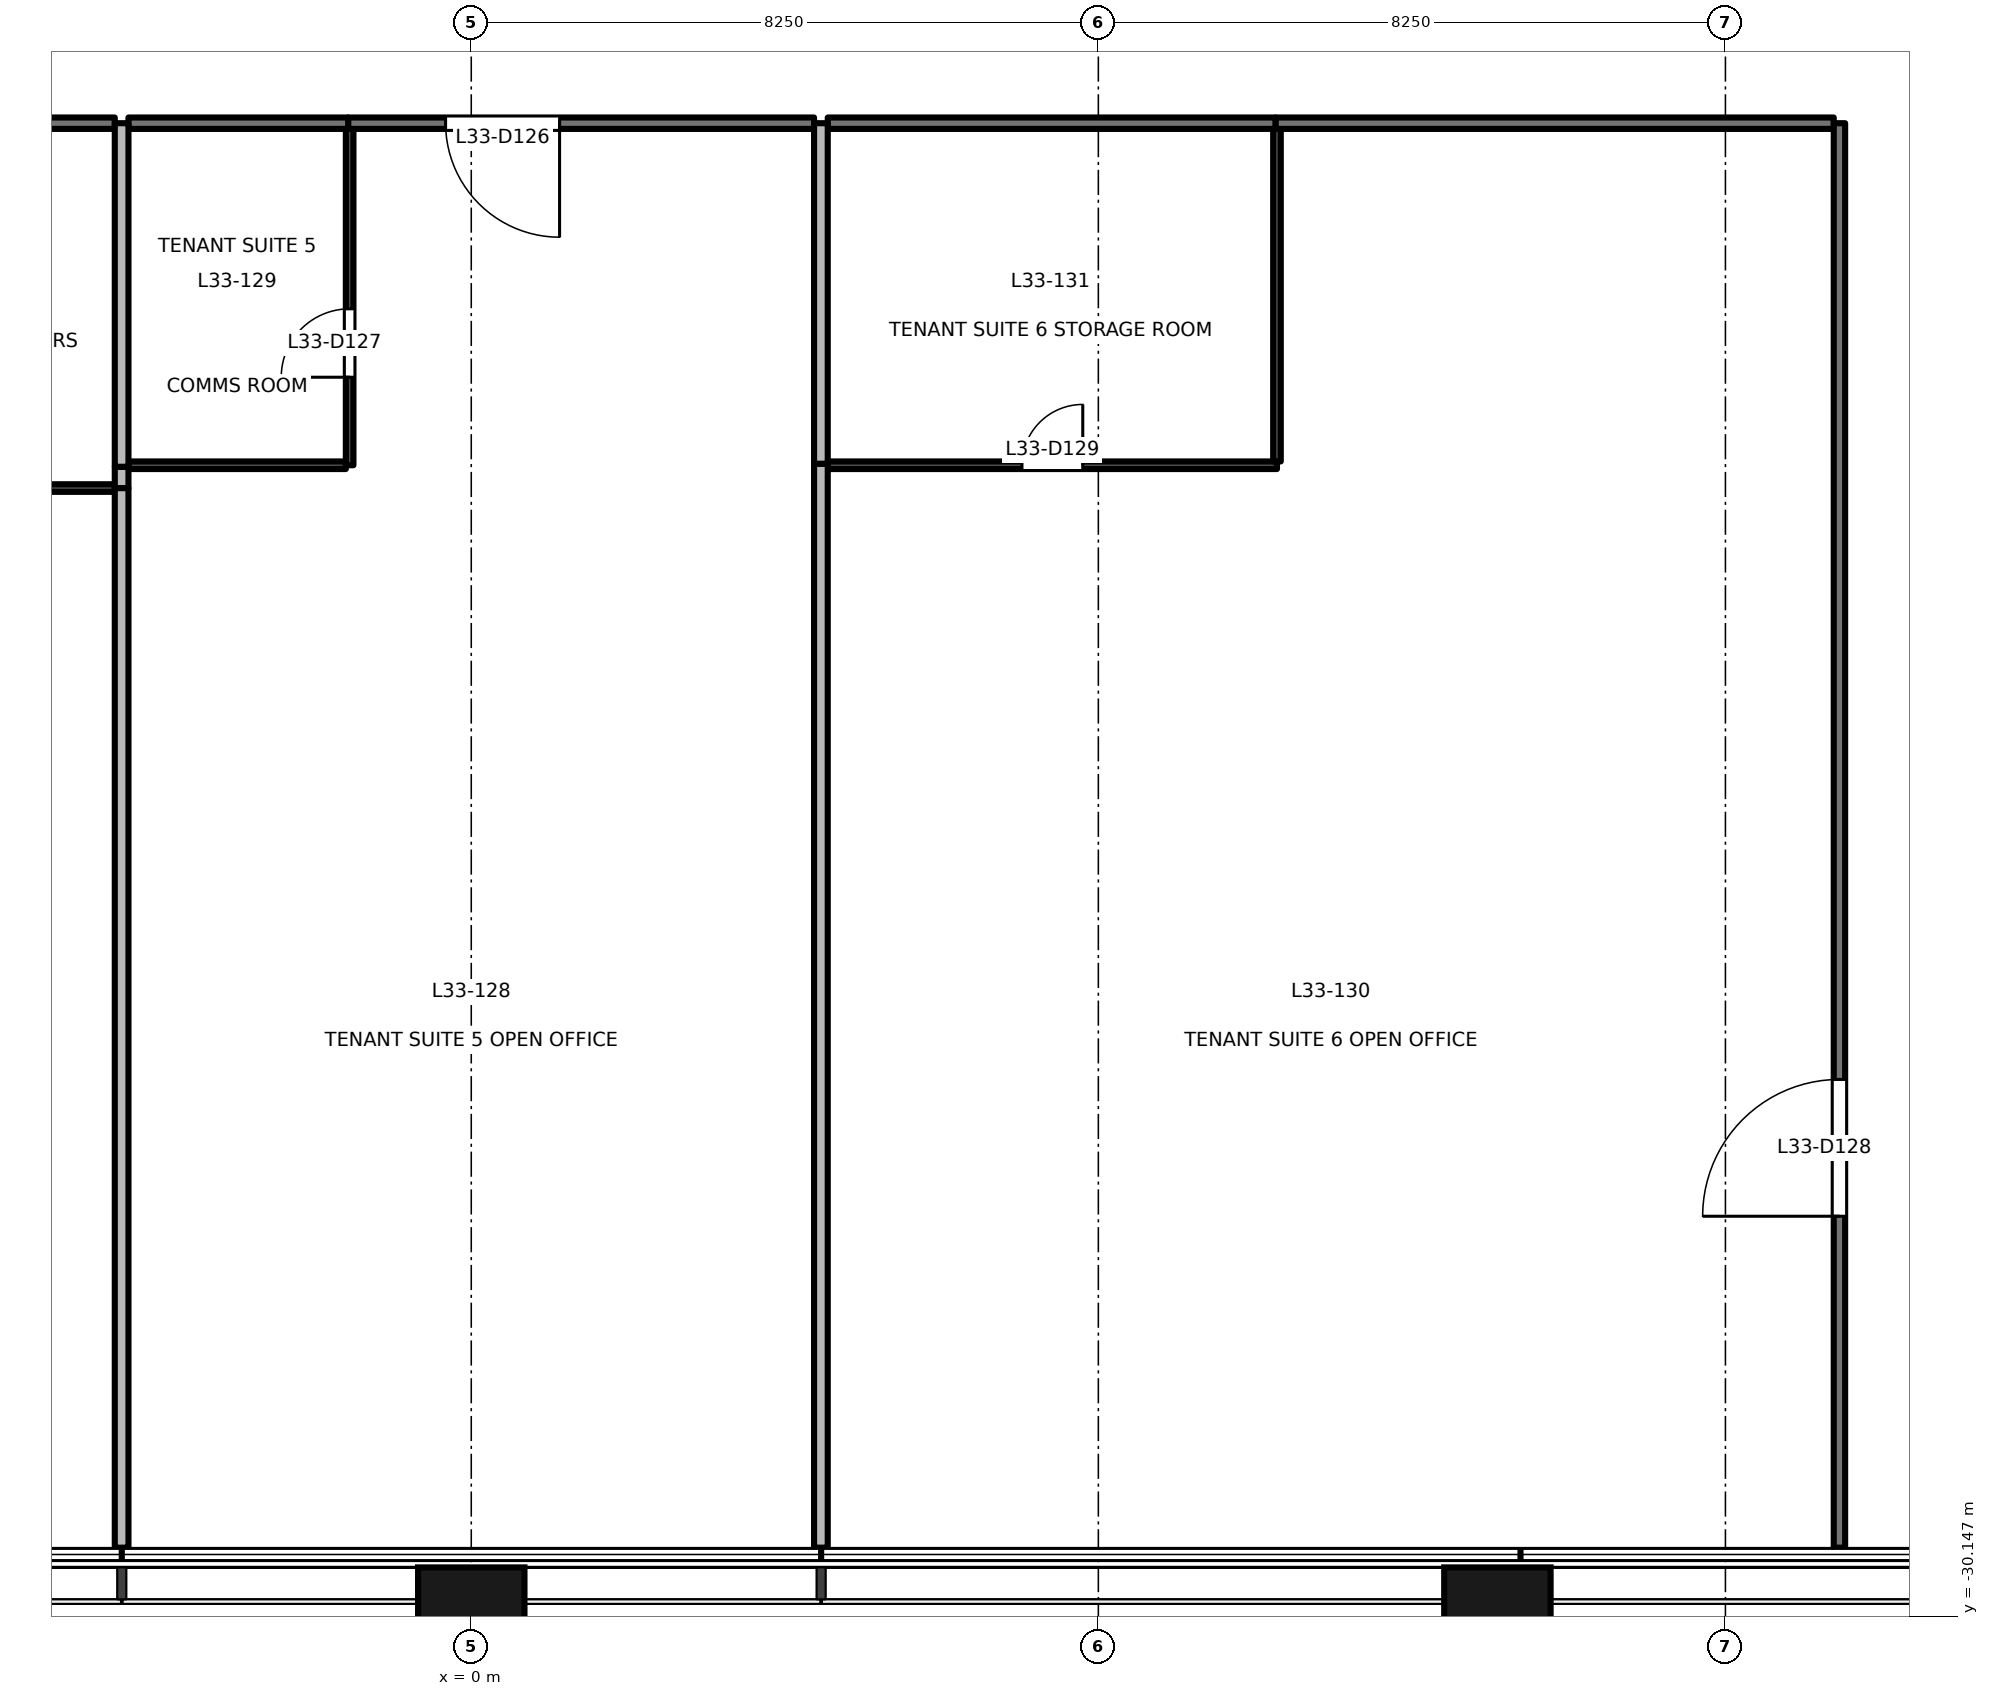
"""IFC4 building model, lengths in metres.
Left out: names, types, materials, properties, quantities, classifications, styles, units other than length and angle.
Written with IfcOpenShell. Run it as: python <this file> out.ifc"""

import sys

from ifc_helpers import new_model, si_unit, direction, frame, frame_2d, origin, origin_2d, place, context, subcontext, project, spatial, rectangle, extrude, element, fill, save


model = new_model("IFC4")
c1 = context("Model", 3, precision=1e-05, world=origin(), true_north=direction((0.0, 1.0)))
c2 = subcontext(c1, "Body", "Model", "MODEL_VIEW")
j1 = project(units=[si_unit("LENGTHUNIT", "METRE"), si_unit("PLANEANGLEUNIT", "RADIAN")], contexts=[c1])
p1 = place(None, origin())
s1 = spatial("IfcSite", under=j1, at=p1, CompositionType="ELEMENT")
p2 = place(p1, origin())
s2 = spatial("IfcBuilding", under=s1, at=p2, CompositionType="ELEMENT")
p3 = place(p2, frame((0.0, 0.0, 146.1)))
s3 = spatial("IfcBuildingStorey", under=s2, at=p3, CompositionType="ELEMENT", Elevation=146.1)
for number, where, z_axis, x_axis in (
    (1, (0.0, -30.4, -0.2), (0.0, 0.0, 1.0), (1.0, 0.0, 0.0)),
    (2, (13.5, -30.4, -0.2), (0.0, 0.0, 1.0), (1.0, 0.0, 0.0)),
):
    element("IfcColumn", number, at=place(p3, frame(where, z_axis=z_axis, x_axis=x_axis)), inside=s3, PredefinedType="COLUMN", context=c2, shape_type="SweptSolid", body=[
        extrude(rectangle(XDim=1.4, YDim=1.8, at=origin_2d()), origin(), (0.0, 0.0, 1.0), 4.0),
    ])
p4 = place(p3, frame((-4.69, -10.5, 0.0), z_axis=(0.0, 0.0, 1.0), x_axis=(-1.0, 0.0, 0.0)))
e3 = element("IfcWall", 3, at=p4, inside=s3, PredefinedType="PARTITIONING", context=c2, shape_type="SweptSolid", body=[
    extrude(rectangle(XDim=5.23, YDim=0.15, at=frame_2d((2.615, 0.0))), origin(), (0.0, 0.0, 1.0), 2.9),
])
p5 = place(p3, frame((4.51, -10.5, 0.0), z_axis=(0.0, 0.0, 1.0), x_axis=(-1.0, 0.0, 0.0)))
e4 = element("IfcWall", 4, at=p5, inside=s3, PredefinedType="PARTITIONING", context=c2, shape_type="SweptSolid", body=[
    extrude(rectangle(XDim=6.13, YDim=0.15, at=frame_2d((3.065, 0.0))), origin(), (0.0, 0.0, 1.0), 2.9),
])
p6 = place(p5, frame((3.348, 0.0, 0.0)))
e5 = element("IfcOpeningElement", 5, at=p6, cuts=e4, PredefinedType="OPENING", context=c2, shape_type="SweptSolid", body=[
    extrude(rectangle(XDim=1.5, YDim=2.1, at=frame_2d((0.75, 1.05))), frame((0.0, 0.085, 0.0), z_axis=(0.0, -1.0, 0.0), x_axis=(1.0, 0.0, 0.0)), (0.0, 0.0, 1.0), 0.171),
])
p7 = place(p3, frame((-1.62, -10.5, 0.0), z_axis=(0.0, 0.0, 1.0), x_axis=(-1.0, 0.0, 0.0)))
e6 = element("IfcWall", 6, at=p7, inside=s3, PredefinedType="PARTITIONING", context=c2, shape_type="SweptSolid", body=[
    extrude(rectangle(XDim=2.89, YDim=0.15, at=frame_2d((1.445, 0.0))), origin(), (0.0, 0.0, 1.0), 2.9),
])
p8 = place(p3, frame((17.925, -10.5, 0.0), z_axis=(0.0, 0.0, 1.0), x_axis=(-1.0, 0.0, 0.0)))
e7 = element("IfcWall", 7, at=p8, inside=s3, PredefinedType="PARTITIONING", context=c2, shape_type="SweptSolid", body=[
    extrude(rectangle(XDim=7.345, YDim=0.15, at=frame_2d((3.672, 0.0))), origin(), (0.0, 0.0, 1.0), 2.9),
])
p9 = place(p3, frame((18.0, -29.24, 0.0), z_axis=(0.0, 0.0, 1.0), x_axis=(0.0, 1.0, 0.0)))
e8 = element("IfcWall", 8, at=p9, inside=s3, PredefinedType="PARTITIONING", context=c2, shape_type="SweptSolid", body=[
    extrude(rectangle(XDim=18.74, YDim=0.15, at=frame_2d((9.37, 0.0))), origin(), (0.0, 0.0, 1.0), 3.8),
])
p10 = place(p9, frame((4.36, 0.0, 0.0)))
e9 = element("IfcOpeningElement", 9, at=p10, cuts=e8, PredefinedType="OPENING", context=c2, shape_type="SweptSolid", body=[
    extrude(rectangle(XDim=1.8, YDim=2.1, at=frame_2d((0.9, 1.05))), frame((0.0, 0.085, 0.0), z_axis=(0.0, -1.0, 0.0), x_axis=(1.0, 0.0, 0.0)), (0.0, 0.0, 1.0), 0.171),
])
p11 = place(p3, frame((10.58, -10.5, 0.0), z_axis=(0.0, 0.0, 1.0), x_axis=(-1.0, 0.0, 0.0)))
e10 = element("IfcWall", 10, at=p11, inside=s3, PredefinedType="PARTITIONING", context=c2, shape_type="SweptSolid", body=[
    extrude(rectangle(XDim=5.89, YDim=0.15, at=frame_2d((2.945, 0.0))), origin(), (0.0, 0.0, 1.0), 2.9),
])
p12 = place(p3, frame((-9.9, -15.3, 0.0), z_axis=(0.0, 0.0, 1.0), x_axis=(1.0, 0.0, 0.0)))
e11 = element("IfcWall", 11, at=p12, inside=s3, PredefinedType="PARTITIONING", context=c2, shape_type="SweptSolid", body=[
    extrude(rectangle(XDim=5.21, YDim=0.1, at=frame_2d((2.605, 0.0))), origin(), (0.0, 0.0, 1.0), 2.9),
])
p13 = place(p12, frame((2.205, 0.0, 0.0)))
e12 = element("IfcOpeningElement", 12, at=p13, cuts=e11, PredefinedType="OPENING", context=c2, shape_type="SweptSolid", body=[
    extrude(rectangle(XDim=0.8, YDim=2.1, at=frame_2d((0.4, 1.05))), frame((0.0, 0.061, 0.0), z_axis=(0.0, -1.0, 0.0), x_axis=(1.0, 0.0, 0.0)), (0.0, 0.0, 1.0), 0.121),
])
p14 = place(p3, frame((-4.6, -15.3, 0.0), z_axis=(0.0, 0.0, 1.0), x_axis=(0.0, -1.0, 0.0)))
e13 = element("IfcWall", 13, at=p14, inside=s3, PredefinedType="PARTITIONING", context=c2, shape_type="SweptSolid", body=[
    extrude(rectangle(XDim=13.94, YDim=0.18, at=frame_2d((6.97, 0.0))), origin(), (0.0, 0.0, 1.0), 2.9),
])
p15 = place(p3, frame((-4.6, -15.02, 0.0), z_axis=(0.0, 0.0, 1.0), x_axis=(0.0, -1.0, 0.0)))
e14 = element("IfcWall", 14, at=p15, inside=s3, PredefinedType="PARTITIONING", context=c2, shape_type="SweptSolid", body=[
    extrude(rectangle(XDim=0.28, YDim=0.18, at=frame_2d((0.14, 0.0))), origin(), (0.0, 0.0, 1.0), 2.9),
])
p16 = place(p3, frame((-4.6, -10.5, 0.0), z_axis=(0.0, 0.0, 1.0), x_axis=(0.0, -1.0, 0.0)))
e15 = element("IfcWall", 15, at=p16, inside=s3, PredefinedType="PARTITIONING", context=c2, shape_type="SweptSolid", body=[
    extrude(rectangle(XDim=4.52, YDim=0.18, at=frame_2d((2.26, 0.0))), origin(), (0.0, 0.0, 1.0), 2.9),
])
p17 = place(p3, frame((-4.51, -15.0, 0.0), z_axis=(0.0, 0.0, 1.0), x_axis=(1.0, 0.0, 0.0)))
e16 = element("IfcWall", 16, at=p17, inside=s3, PredefinedType="PARTITIONING", context=c2, shape_type="SweptSolid", body=[
    extrude(rectangle(XDim=2.86, YDim=0.1, at=frame_2d((1.43, 0.0))), origin(), (0.0, 0.0, 1.0), 2.9),
])
p18 = place(p3, frame((-1.6, -15.0, 0.0), z_axis=(0.0, 0.0, 1.0), x_axis=(0.0, 1.0, 0.0)))
e17 = element("IfcWall", 17, at=p18, inside=s3, PredefinedType="PARTITIONING", context=c2, shape_type="SweptSolid", body=[
    extrude(rectangle(XDim=4.425, YDim=0.1, at=frame_2d((2.212, 0.0))), origin(), (0.0, 0.0, 1.0), 3.8),
])
p19 = place(p18, frame((1.158, 0.0, 0.0)))
e18 = element("IfcOpeningElement", 18, at=p19, cuts=e17, PredefinedType="OPENING", context=c2, shape_type="SweptSolid", body=[
    extrude(rectangle(XDim=0.9, YDim=2.1, at=frame_2d((0.45, 1.05))), frame((0.0, 0.061, 0.0), z_axis=(0.0, -1.0, 0.0), x_axis=(1.0, 0.0, 0.0)), (0.0, 0.0, 1.0), 0.121),
])
p20 = place(p3, frame((4.6, -14.98, 0.0), z_axis=(0.0, 0.0, 1.0), x_axis=(0.0, -1.0, 0.0)))
e19 = element("IfcWall", 19, at=p20, inside=s3, PredefinedType="PARTITIONING", context=c2, shape_type="SweptSolid", body=[
    extrude(rectangle(XDim=14.26, YDim=0.18, at=frame_2d((7.13, 0.0))), origin(), (0.0, 0.0, 1.0), 2.9),
])
p21 = place(p3, frame((4.6, -10.5, 0.0), z_axis=(0.0, 0.0, 1.0), x_axis=(0.0, -1.0, 0.0)))
e20 = element("IfcWall", 20, at=p21, inside=s3, PredefinedType="PARTITIONING", context=c2, shape_type="SweptSolid", body=[
    extrude(rectangle(XDim=4.48, YDim=0.18, at=frame_2d((2.24, 0.0))), origin(), (0.0, 0.0, 1.0), 2.9),
])
p22 = place(p3, frame((4.69, -15.0, 0.0), z_axis=(0.0, 0.0, 1.0), x_axis=(1.0, 0.0, 0.0)))
e21 = element("IfcWall", 21, at=p22, inside=s3, PredefinedType="PARTITIONING", context=c2, shape_type="SweptSolid", body=[
    extrude(rectangle(XDim=5.91, YDim=0.1, at=frame_2d((2.955, 0.0))), origin(), (0.0, 0.0, 1.0), 2.9),
])
p23 = place(p22, frame((2.555, 0.0, 0.0)))
e22 = element("IfcOpeningElement", 22, at=p23, cuts=e21, PredefinedType="OPENING", context=c2, shape_type="SweptSolid", body=[
    extrude(rectangle(XDim=0.8, YDim=2.1, at=frame_2d((0.4, 1.05))), frame((0.0, 0.061, 0.0), z_axis=(0.0, -1.0, 0.0), x_axis=(1.0, 0.0, 0.0)), (0.0, 0.0, 1.0), 0.121),
])
p24 = place(p3, frame((10.6, -14.95, 0.0), z_axis=(0.0, 0.0, 1.0), x_axis=(0.0, 1.0, 0.0)))
e23 = element("IfcWall", 23, at=p24, inside=s3, PredefinedType="PARTITIONING", context=c2, shape_type="SweptSolid", body=[
    extrude(rectangle(XDim=4.375, YDim=0.1, at=frame_2d((2.188, 0.0))), origin(), (0.0, 0.0, 1.0), 3.8),
])
p25 = place(p6, origin())
e24 = element("IfcDoor", 24, at=p25, inside=s3, OperationType="DOUBLE_DOOR_SINGLE_SWING", PredefinedType="DOOR", context=c2, shape_type="SweptSolid", body=[
    extrude(rectangle(XDim=1.5, YDim=2.1, at=frame_2d((0.75, 1.05))), frame((0.0, 0.025, 0.0), z_axis=(0.0, -1.0, 0.0), x_axis=(1.0, 0.0, 0.0)), (0.0, 0.0, 1.0), 0.05),
])
fill(e5, e24)
p26 = place(p19, origin())
e25 = element("IfcDoor", 25, at=p26, inside=s3, OperationType="SINGLE_SWING_LEFT", PredefinedType="DOOR", context=c2, shape_type="SweptSolid", body=[
    extrude(rectangle(XDim=0.9, YDim=2.1, at=frame_2d((0.45, 1.05))), frame((0.0, 0.025, 0.0), z_axis=(0.0, -1.0, 0.0), x_axis=(1.0, 0.0, 0.0)), (0.0, 0.0, 1.0), 0.05),
])
fill(e18, e25)
p27 = place(p10, origin())
e26 = element("IfcDoor", 26, at=p27, inside=s3, OperationType="DOUBLE_DOOR_SINGLE_SWING", PredefinedType="DOOR", context=c2, shape_type="SweptSolid", body=[
    extrude(rectangle(XDim=1.8, YDim=2.1, at=frame_2d((0.9, 1.05))), frame((0.0, 0.025, 0.0), z_axis=(0.0, -1.0, 0.0), x_axis=(1.0, 0.0, 0.0)), (0.0, 0.0, 1.0), 0.05),
])
fill(e9, e26)
p28 = place(p23, origin())
e27 = element("IfcDoor", 27, at=p28, inside=s3, OperationType="SINGLE_SWING_RIGHT", PredefinedType="DOOR", context=c2, shape_type="SweptSolid", body=[
    extrude(rectangle(XDim=0.8, YDim=2.1, at=frame_2d((0.4, 1.05))), frame((0.0, 0.025, 0.0), z_axis=(0.0, -1.0, 0.0), x_axis=(1.0, 0.0, 0.0)), (0.0, 0.0, 1.0), 0.05),
])
fill(e22, e27)
save(model, sys.argv[1])
